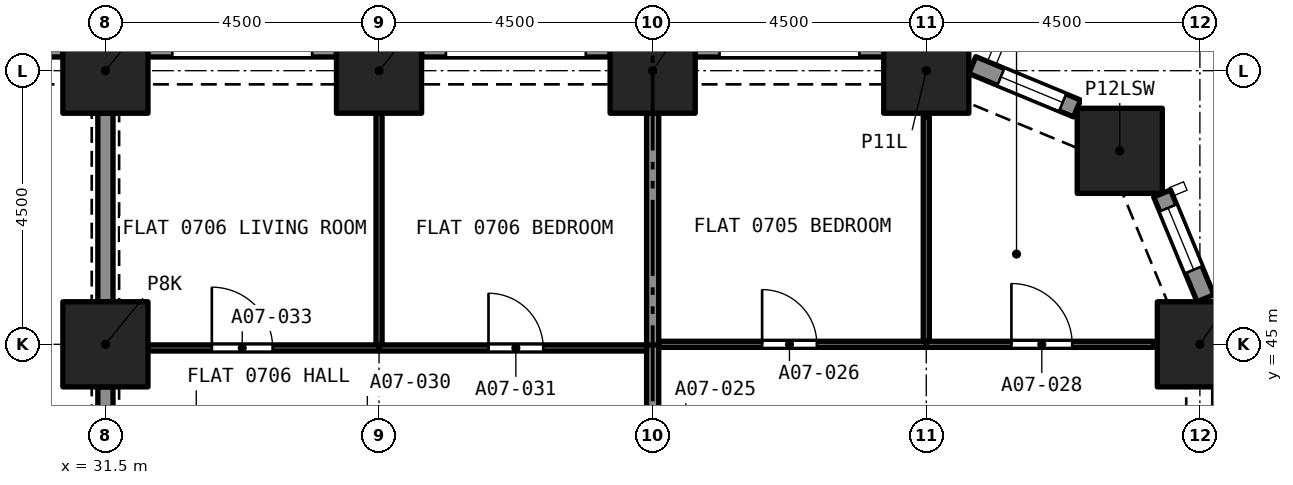
"""IFC4 building model, lengths in metres.
Left out: names, types, materials, properties, quantities, classifications, styles, units other than length and angle.
Written with IfcOpenShell. Run it as: python <this file> out.ifc"""

import sys

from ifc_helpers import new_model, si_unit, direction, frame, frame_2d, origin, origin_2d, place, context, subcontext, project, spatial, rectangle, extrude, element, fill, save


model = new_model("IFC4")
c1 = context("Model", 3, precision=1e-05, world=origin(), true_north=direction((0.0, 1.0)))
c2 = subcontext(c1, "Body", "Model", "MODEL_VIEW")
j1 = project(units=[si_unit("LENGTHUNIT", "METRE"), si_unit("PLANEANGLEUNIT", "RADIAN")], contexts=[c1])
p1 = place(None, origin())
s1 = spatial("IfcSite", under=j1, at=p1, CompositionType="ELEMENT")
p2 = place(p1, origin())
s2 = spatial("IfcBuilding", under=s1, at=p2, CompositionType="ELEMENT")
p3 = place(p2, frame((0.0, 0.0, 33.6)))
s3 = spatial("IfcBuildingStorey", under=s2, at=p3, CompositionType="ELEMENT", Elevation=33.6)
for number, where, z_axis, x_axis in (
    (1, (31.5, 45.0, 0.0), (0.0, 0.0, 1.0), (1.0, 0.0, 0.0)),
    (2, (49.5, 45.0, 0.0), (0.0, 0.0, 1.0), (1.0, 0.0, 0.0)),
    (3, (48.182, 48.182, 0.0), (0.0, 0.0, 1.0), (1.0, 0.0, 0.0)),
    (4, (31.5, 49.5, 0.0), (0.0, 0.0, 1.0), (1.0, 0.0, 0.0)),
    (5, (36.0, 49.5, 0.0), (0.0, 0.0, 1.0), (1.0, 0.0, 0.0)),
    (6, (40.5, 49.5, 0.0), (0.0, 0.0, 1.0), (1.0, 0.0, 0.0)),
    (7, (45.0, 49.5, 0.0), (0.0, 0.0, 1.0), (1.0, 0.0, 0.0)),
):
    element("IfcColumn", number, at=place(p3, frame(where, z_axis=z_axis, x_axis=x_axis)), inside=s3, PredefinedType="COLUMN", context=c2, shape_type="SweptSolid", body=[
        extrude(rectangle(XDim=1.4, YDim=1.4, at=origin_2d()), origin(), (0.0, 0.0, 1.0), 3.2),
    ])
p4 = place(p3, frame((48.878, 47.48, 0.0), z_axis=(0.0, 0.0, 1.0), x_axis=(0.38262540684, -0.923903565336, 0.0)))
e8 = element("IfcWall", 8, at=p4, inside=s3, PredefinedType="SOLIDWALL", context=c2, shape_type="SweptSolid", body=[
    extrude(rectangle(XDim=1.865, YDim=0.3, at=frame_2d((0.933, 0.0))), origin(), (0.0, 0.0, 1.0), 3.2),
])
p5 = place(p4, frame((0.258, 0.0, 0.45)))
e9 = element("IfcOpeningElement", 9, at=p5, cuts=e8, PredefinedType="OPENING", context=c2, shape_type="SweptSolid", body=[
    extrude(rectangle(XDim=1.1, YDim=1.95, at=frame_2d((0.55, 0.975))), frame((0.0, 0.16, 0.0), z_axis=(0.0, -1.0, 0.0), x_axis=(1.0, 0.0, 0.0)), (0.0, 0.0, 1.0), 0.32),
])
p6 = place(p3, frame((45.757, 49.592, 0.0), z_axis=(0.0, 0.0, 1.0), x_axis=(0.923857286003, -0.382737135771, 0.0)))
e10 = element("IfcWall", 10, at=p6, inside=s3, PredefinedType="SOLIDWALL", context=c2, shape_type="SweptSolid", body=[
    extrude(rectangle(XDim=1.865, YDim=0.3, at=frame_2d((0.933, 0.0))), origin(), (0.0, 0.0, 1.0), 3.2),
])
p7 = place(p6, frame((0.508, 0.0, 0.45)))
e11 = element("IfcOpeningElement", 11, at=p7, cuts=e10, PredefinedType="OPENING", context=c2, shape_type="SweptSolid", body=[
    extrude(rectangle(XDim=1.1, YDim=1.95, at=frame_2d((0.55, 0.975))), frame((0.0, 0.16, 0.0), z_axis=(0.0, -1.0, 0.0), x_axis=(1.0, 0.0, 0.0)), (0.0, 0.0, 1.0), 0.32),
])
p8 = place(p3, frame((41.2, 49.875, 0.0), z_axis=(0.0, 0.0, 1.0), x_axis=(1.0, 0.0, 0.0)))
e12 = element("IfcWall", 12, at=p8, inside=s3, PredefinedType="SOLIDWALL", context=c2, shape_type="SweptSolid", body=[
    extrude(rectangle(XDim=3.1, YDim=0.3, at=frame_2d((1.55, 0.0))), origin(), (0.0, 0.0, 1.0), 3.2),
])
p9 = place(p8, frame((0.4, 0.0, 0.45)))
e13 = element("IfcOpeningElement", 13, at=p9, cuts=e12, PredefinedType="OPENING", context=c2, shape_type="SweptSolid", body=[
    extrude(rectangle(XDim=2.3, YDim=1.95, at=frame_2d((1.15, 0.975))), frame((0.0, 0.16, 0.0), z_axis=(0.0, -1.0, 0.0), x_axis=(1.0, 0.0, 0.0)), (0.0, 0.0, 1.0), 0.32),
])
p10 = place(p3, frame((36.7, 49.875, 0.0), z_axis=(0.0, 0.0, 1.0), x_axis=(1.0, 0.0, 0.0)))
e14 = element("IfcWall", 14, at=p10, inside=s3, PredefinedType="SOLIDWALL", context=c2, shape_type="SweptSolid", body=[
    extrude(rectangle(XDim=3.1, YDim=0.3, at=frame_2d((1.55, 0.0))), origin(), (0.0, 0.0, 1.0), 3.2),
])
p11 = place(p10, frame((0.4, 0.0, 0.45)))
e15 = element("IfcOpeningElement", 15, at=p11, cuts=e14, PredefinedType="OPENING", context=c2, shape_type="SweptSolid", body=[
    extrude(rectangle(XDim=2.3, YDim=1.95, at=frame_2d((1.15, 0.975))), frame((0.0, 0.16, 0.0), z_axis=(0.0, -1.0, 0.0), x_axis=(1.0, 0.0, 0.0)), (0.0, 0.0, 1.0), 0.32),
])
p12 = place(p3, frame((32.2, 49.875, 0.0), z_axis=(0.0, 0.0, 1.0), x_axis=(1.0, 0.0, 0.0)))
e16 = element("IfcWall", 16, at=p12, inside=s3, PredefinedType="SOLIDWALL", context=c2, shape_type="SweptSolid", body=[
    extrude(rectangle(XDim=3.1, YDim=0.3, at=frame_2d((1.55, 0.0))), origin(), (0.0, 0.0, 1.0), 3.2),
])
p13 = place(p12, frame((0.4, 0.0, 0.45)))
e17 = element("IfcOpeningElement", 17, at=p13, cuts=e16, PredefinedType="OPENING", context=c2, shape_type="SweptSolid", body=[
    extrude(rectangle(XDim=2.3, YDim=1.95, at=frame_2d((1.15, 0.975))), frame((0.0, 0.16, 0.0), z_axis=(0.0, -1.0, 0.0), x_axis=(1.0, 0.0, 0.0)), (0.0, 0.0, 1.0), 0.32),
])
p14 = place(p3, frame((27.7, 49.875, 0.0), z_axis=(0.0, 0.0, 1.0), x_axis=(1.0, 0.0, 0.0)))
e18 = element("IfcWall", 18, at=p14, inside=s3, PredefinedType="SOLIDWALL", context=c2, shape_type="SweptSolid", body=[
    extrude(rectangle(XDim=3.1, YDim=0.3, at=frame_2d((1.55, 0.0))), origin(), (0.0, 0.0, 1.0), 3.2),
])
p15 = place(p14, frame((0.4, 0.0, 0.45)))
e19 = element("IfcOpeningElement", 19, at=p15, cuts=e18, PredefinedType="OPENING", context=c2, shape_type="SweptSolid", body=[
    extrude(rectangle(XDim=2.3, YDim=1.95, at=frame_2d((1.15, 0.975))), frame((0.0, 0.16, 0.0), z_axis=(0.0, -1.0, 0.0), x_axis=(1.0, 0.0, 0.0)), (0.0, 0.0, 1.0), 0.32),
])
p16 = place(p3, frame((40.6, 45.0, 0.0), z_axis=(0.0, 0.0, 1.0), x_axis=(1.0, 0.0, 0.0)))
e20 = element("IfcWall", 20, at=p16, inside=s3, PredefinedType="PARTITIONING", context=c2, shape_type="SweptSolid", body=[
    extrude(rectangle(XDim=4.4, YDim=0.1, at=frame_2d((2.2, 0.0))), origin(), (0.0, 0.0, 1.0), 2.9),
])
p17 = place(p16, frame((1.7, 0.0, 0.0)))
e21 = element("IfcOpeningElement", 21, at=p17, cuts=e20, PredefinedType="OPENING", context=c2, shape_type="SweptSolid", body=[
    extrude(rectangle(XDim=0.9, YDim=2.1, at=frame_2d((0.45, 1.05))), frame((0.0, 0.06, 0.0), z_axis=(0.0, -1.0, 0.0), x_axis=(1.0, 0.0, 0.0)), (0.0, 0.0, 1.0), 0.12),
])
p18 = place(p3, frame((45.0, 45.05, 0.0), z_axis=(0.0, 0.0, 1.0), x_axis=(0.0, 1.0, 0.0)))
e22 = element("IfcWall", 22, at=p18, inside=s3, PredefinedType="PARTITIONING", context=c2, shape_type="SweptSolid", body=[
    extrude(rectangle(XDim=3.692, YDim=0.1, at=frame_2d((1.846, 0.0))), origin(), (0.0, 0.0, 1.0), 2.9),
])
p19 = place(p3, frame((40.5, 44.95, 0.0), z_axis=(0.0, 0.0, 1.0), x_axis=(0.0, 1.0, 0.0)))
e23 = element("IfcWall", 23, at=p19, inside=s3, PredefinedType="PARTITIONING", context=c2, shape_type="SweptSolid", body=[
    extrude(rectangle(XDim=3.85, YDim=0.2, at=frame_2d((1.925, 0.0))), origin(), (0.0, 0.0, 1.0), 2.9),
])
p20 = place(p3, frame((45.0, 45.0, 0.0), z_axis=(0.0, 0.0, 1.0), x_axis=(1.0, 0.0, 0.0)))
e24 = element("IfcWall", 24, at=p20, inside=s3, PredefinedType="PARTITIONING", context=c2, shape_type="SweptSolid", body=[
    extrude(rectangle(XDim=3.742, YDim=0.1, at=frame_2d((1.871, 0.0))), origin(), (0.0, 0.0, 1.0), 2.9),
])
p21 = place(p20, frame((1.4, 0.0, 0.0)))
e25 = element("IfcOpeningElement", 25, at=p21, cuts=e24, PredefinedType="OPENING", context=c2, shape_type="SweptSolid", body=[
    extrude(rectangle(XDim=1.0, YDim=2.1, at=frame_2d((0.5, 1.05))), frame((0.0, 0.06, 0.0), z_axis=(0.0, -1.0, 0.0), x_axis=(1.0, 0.0, 0.0)), (0.0, 0.0, 1.0), 0.12),
])
p22 = place(p3, frame((40.5, 43.698, 0.0), z_axis=(0.0, 0.0, 1.0), x_axis=(0.0, 1.0, 0.0)))
e26 = element("IfcWall", 26, at=p22, inside=s3, PredefinedType="PARTITIONING", context=c2, shape_type="SweptSolid", body=[
    extrude(rectangle(XDim=1.292, YDim=0.2, at=frame_2d((0.646, 0.0))), origin(), (0.0, 0.0, 1.0), 2.9),
])
p23 = place(p3, frame((36.0, 44.94, 0.0), z_axis=(0.0, 0.0, 1.0), x_axis=(1.0, 0.0, 0.0)))
e27 = element("IfcWall", 27, at=p23, inside=s3, PredefinedType="PARTITIONING", context=c2, shape_type="SweptSolid", body=[
    extrude(rectangle(XDim=4.4, YDim=0.1, at=frame_2d((2.2, 0.0))), origin(), (0.0, 0.0, 1.0), 2.9),
])
p24 = place(p23, frame((1.8, 0.0, 0.0)))
e28 = element("IfcOpeningElement", 28, at=p24, cuts=e27, PredefinedType="OPENING", context=c2, shape_type="SweptSolid", body=[
    extrude(rectangle(XDim=0.9, YDim=2.1, at=frame_2d((0.45, 1.05))), frame((0.0, 0.06, 0.0), z_axis=(0.0, -1.0, 0.0), x_axis=(1.0, 0.0, 0.0)), (0.0, 0.0, 1.0), 0.12),
])
p25 = place(p3, frame((36.0, 44.99, 0.0), z_axis=(0.0, 0.0, 1.0), x_axis=(0.0, 1.0, 0.0)))
e29 = element("IfcWall", 29, at=p25, inside=s3, PredefinedType="PARTITIONING", context=c2, shape_type="SweptSolid", body=[
    extrude(rectangle(XDim=3.81, YDim=0.1, at=frame_2d((1.905, 0.0))), origin(), (0.0, 0.0, 1.0), 2.9),
])
p26 = place(p3, frame((32.2, 44.94, 0.0), z_axis=(0.0, 0.0, 1.0), x_axis=(1.0, 0.0, 0.0)))
e30 = element("IfcWall", 30, at=p26, inside=s3, PredefinedType="PARTITIONING", context=c2, shape_type="SweptSolid", body=[
    extrude(rectangle(XDim=3.8, YDim=0.1, at=frame_2d((1.9, 0.0))), origin(), (0.0, 0.0, 1.0), 2.9),
])
p27 = place(p26, frame((1.05, 0.0, 0.0)))
e31 = element("IfcOpeningElement", 31, at=p27, cuts=e30, PredefinedType="OPENING", context=c2, shape_type="SweptSolid", body=[
    extrude(rectangle(XDim=1.0, YDim=2.1, at=frame_2d((0.5, 1.05))), frame((0.0, 0.06, 0.0), z_axis=(0.0, -1.0, 0.0), x_axis=(1.0, 0.0, 0.0)), (0.0, 0.0, 1.0), 0.12),
])
for number, where, z_axis, x_axis in (
    (32, (31.5, 41.2, 0.0), (0.0, 0.0, 1.0), (0.0, 1.0, 0.0)),
    (33, (31.5, 45.7, 0.0), (0.0, 0.0, 1.0), (0.0, 1.0, 0.0)),
):
    element("IfcWall", number, at=place(p3, frame(where, z_axis=z_axis, x_axis=x_axis)), inside=s3, PredefinedType="PARTITIONING", context=c2, shape_type="SweptSolid", body=[
        extrude(rectangle(XDim=3.1, YDim=0.25, at=frame_2d((1.55, 0.0))), origin(), (0.0, 0.0, 1.0), 2.38),
    ])
p28 = place(p5, origin())
e34 = element("IfcWindow", 34, at=p28, inside=s3, PartitioningType="SINGLE_PANEL", PredefinedType="WINDOW", context=c2, shape_type="SweptSolid", body=[
    extrude(rectangle(XDim=1.1, YDim=1.95, at=frame_2d((0.55, 0.975))), frame((0.0, 0.03, 0.0), z_axis=(0.0, -1.0, 0.0), x_axis=(1.0, 0.0, 0.0)), (0.0, 0.0, 1.0), 0.06),
])
fill(e9, e34)
p29 = place(p7, origin())
e35 = element("IfcWindow", 35, at=p29, inside=s3, PartitioningType="SINGLE_PANEL", PredefinedType="WINDOW", context=c2, shape_type="SweptSolid", body=[
    extrude(rectangle(XDim=1.1, YDim=1.95, at=frame_2d((0.55, 0.975))), frame((0.0, 0.03, 0.0), z_axis=(0.0, -1.0, 0.0), x_axis=(1.0, 0.0, 0.0)), (0.0, 0.0, 1.0), 0.06),
])
fill(e11, e35)
p30 = place(p17, origin())
e36 = element("IfcDoor", 36, at=p30, inside=s3, OperationType="SINGLE_SWING_LEFT", PredefinedType="DOOR", context=c2, shape_type="SweptSolid", body=[
    extrude(rectangle(XDim=0.9, YDim=2.1, at=frame_2d((0.45, 1.05))), frame((0.0, 0.025, 0.0), z_axis=(0.0, -1.0, 0.0), x_axis=(1.0, 0.0, 0.0)), (0.0, 0.0, 1.0), 0.05),
])
fill(e21, e36)
p31 = place(p21, origin())
e37 = element("IfcDoor", 37, at=p31, inside=s3, OperationType="SINGLE_SWING_RIGHT", PredefinedType="DOOR", context=c2, shape_type="SweptSolid", body=[
    extrude(rectangle(XDim=1.0, YDim=2.1, at=frame_2d((0.5, 1.05))), frame((0.0, 0.025, 0.0), z_axis=(0.0, -1.0, 0.0), x_axis=(1.0, 0.0, 0.0)), (0.0, 0.0, 1.0), 0.05),
])
fill(e25, e37)
p32 = place(p24, origin())
e38 = element("IfcDoor", 38, at=p32, inside=s3, OperationType="SINGLE_SWING_RIGHT", PredefinedType="DOOR", context=c2, shape_type="SweptSolid", body=[
    extrude(rectangle(XDim=0.9, YDim=2.1, at=frame_2d((0.45, 1.05))), frame((0.0, 0.025, 0.0), z_axis=(0.0, -1.0, 0.0), x_axis=(1.0, 0.0, 0.0)), (0.0, 0.0, 1.0), 0.05),
])
fill(e28, e38)
p33 = place(p27, origin())
e39 = element("IfcDoor", 39, at=p33, inside=s3, OperationType="SINGLE_SWING_LEFT", PredefinedType="DOOR", context=c2, shape_type="SweptSolid", body=[
    extrude(rectangle(XDim=1.0, YDim=2.1, at=frame_2d((0.5, 1.05))), frame((0.0, 0.025, 0.0), z_axis=(0.0, -1.0, 0.0), x_axis=(1.0, 0.0, 0.0)), (0.0, 0.0, 1.0), 0.05),
])
fill(e31, e39)
save(model, sys.argv[1])
